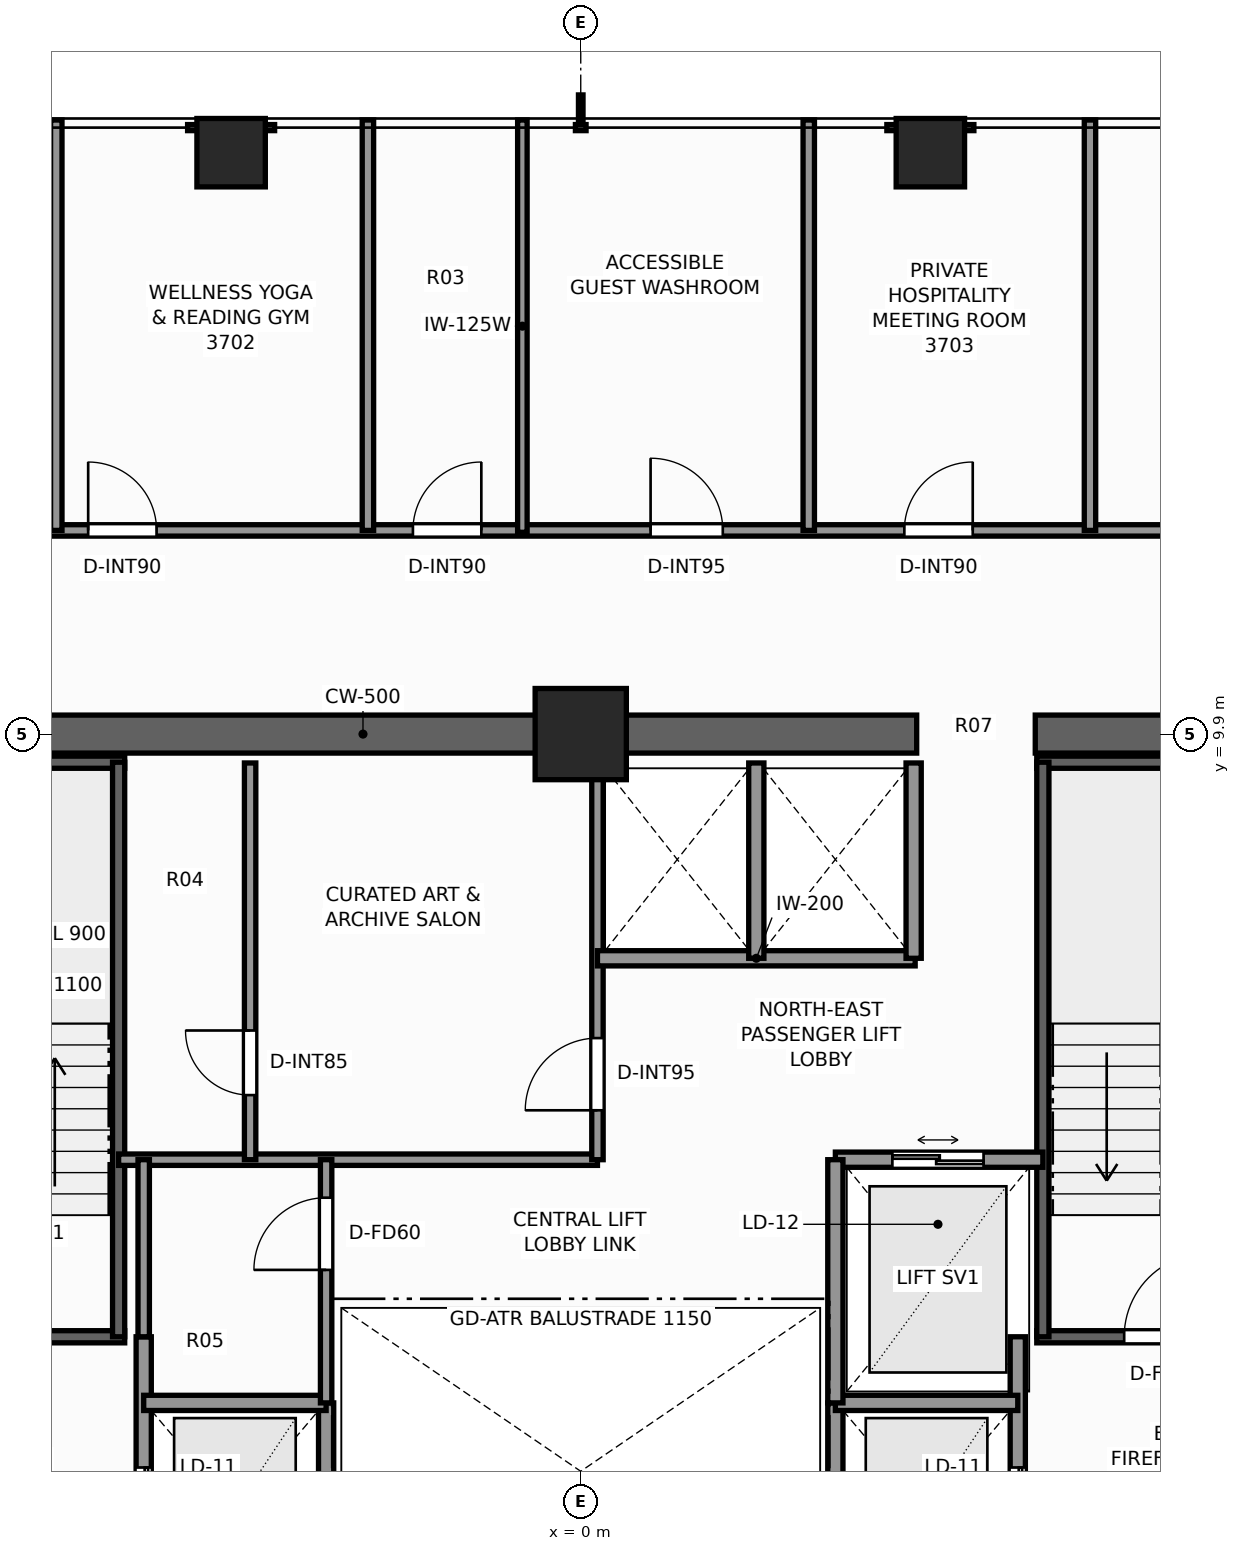
"""IFC4 building model, lengths in metres.
Left out: names, types, materials, properties, quantities, classifications, styles, units other than length and angle.
Written with IfcOpenShell. Run it as: python <this file> out.ifc"""

import sys

from ifc_helpers import new_model, si_unit, direction, frame, frame_2d, origin, origin_2d, place, context, subcontext, project, spatial, rectangle, extrude, element, fill, save


model = new_model("IFC4")
c1 = context("Model", 3, precision=1e-05, world=origin(), true_north=direction((0.0, 1.0)))
c2 = subcontext(c1, "Body", "Model", "MODEL_VIEW")
j1 = project(units=[si_unit("LENGTHUNIT", "METRE"), si_unit("PLANEANGLEUNIT", "RADIAN")], contexts=[c1])
p1 = place(None, origin())
s1 = spatial("IfcSite", under=j1, at=p1, CompositionType="ELEMENT")
p2 = place(p1, origin())
s2 = spatial("IfcBuilding", under=s1, at=p2, CompositionType="ELEMENT")
p3 = place(p2, frame((0.0, 0.0, 128.3)))
s3 = spatial("IfcBuildingStorey", under=s2, at=p3, CompositionType="ELEMENT", Elevation=128.3)
p4 = place(p3, frame((-10.15, 9.9, 0.0), z_axis=(0.0, 0.0, 1.0), x_axis=(1.0, 0.0, 0.0)))
e1 = element("IfcWall", 1, at=p4, inside=s3, PredefinedType="SHEAR", context=c2, shape_type="SweptSolid", body=[
    extrude(rectangle(XDim=14.57, YDim=0.5, at=frame_2d((7.285, 0.0))), origin(), (0.0, 0.0, 1.0), 3.3),
])
p5 = place(p3, frame((5.98, 9.9, 0.0), z_axis=(0.0, 0.0, 1.0), x_axis=(1.0, 0.0, 0.0)))
e2 = element("IfcWall", 2, at=p5, inside=s3, PredefinedType="SHEAR", context=c2, shape_type="SweptSolid", body=[
    extrude(rectangle(XDim=4.17, YDim=0.5, at=frame_2d((2.085, 0.0))), origin(), (0.0, 0.0, 1.0), 3.3),
])
p6 = place(p3, frame((0.0, 9.9, 0.0), z_axis=(0.0, 0.0, 1.0), x_axis=(1.0, 0.0, 0.0)))
e3 = element("IfcColumn", 3, at=p6, inside=s3, PredefinedType="COLUMN", context=c2, shape_type="SweptSolid", body=[
    extrude(rectangle(XDim=1.2, YDim=1.2, at=origin_2d()), origin(), (0.0, 0.0, 1.0), 3.3),
])
for number, where, z_axis, x_axis in (
    (4, (-4.6, 17.55, 0.0), (0.0, 0.0, 1.0), (1.0, 0.0, 0.0)),
    (5, (4.6, 17.55, 0.0), (0.0, 0.0, 1.0), (1.0, 0.0, 0.0)),
):
    element("IfcColumn", number, at=place(p3, frame(where, z_axis=z_axis, x_axis=x_axis)), inside=s3, PredefinedType="COLUMN", context=c2, shape_type="SweptSolid", body=[
        extrude(rectangle(XDim=0.9, YDim=0.9, at=origin_2d()), origin(), (0.0, 0.0, 1.0), 3.3),
    ])
p7 = place(p3, frame((-9.52, 1.97, 0.0), z_axis=(0.0, 0.0, 1.0), x_axis=(1.0, 0.0, 0.0)))
e6 = element("IfcWall", 6, at=p7, inside=s3, PredefinedType="SHEAR", context=c2, shape_type="SweptSolid", body=[
    extrude(rectangle(XDim=3.52, YDim=0.16, at=frame_2d((1.76, 0.0))), origin(), (0.0, 0.0, 1.0), 3.3),
])
p8 = place(p7, frame((1.15, 0.0, 0.0)))
e7 = element("IfcOpeningElement", 7, at=p8, cuts=e6, PredefinedType="OPENING", context=c2, shape_type="SweptSolid", body=[
    extrude(rectangle(XDim=1.1, YDim=2.2, at=frame_2d((0.55, 1.1))), frame((0.0, 0.09, 0.0), z_axis=(0.0, -1.0, 0.0), x_axis=(1.0, 0.0, 0.0)), (0.0, 0.0, 1.0), 0.18),
])
p9 = place(p3, frame((-9.52, 9.53, 0.0), z_axis=(0.0, 0.0, 1.0), x_axis=(1.0, 0.0, 0.0)))
e8 = element("IfcWall", 8, at=p9, inside=s3, PredefinedType="SHEAR", context=c2, shape_type="SweptSolid", body=[
    extrude(rectangle(XDim=3.52, YDim=0.16, at=frame_2d((1.76, 0.0))), origin(), (0.0, 0.0, 1.0), 3.3),
])
p10 = place(p3, frame((-6.08, 1.97, 0.0), z_axis=(0.0, 0.0, 1.0), x_axis=(0.0, 1.0, 0.0)))
e9 = element("IfcWall", 9, at=p10, inside=s3, PredefinedType="SHEAR", context=c2, shape_type="SweptSolid", body=[
    extrude(rectangle(XDim=7.56, YDim=0.16, at=frame_2d((3.78, 0.0))), origin(), (0.0, 0.0, 1.0), 3.3),
])
p11 = place(p3, frame((6.0, 1.97, 0.0), z_axis=(0.0, 0.0, 1.0), x_axis=(1.0, 0.0, 0.0)))
e10 = element("IfcWall", 10, at=p11, inside=s3, PredefinedType="SHEAR", context=c2, shape_type="SweptSolid", body=[
    extrude(rectangle(XDim=3.52, YDim=0.16, at=frame_2d((1.76, 0.0))), origin(), (0.0, 0.0, 1.0), 3.3),
])
p12 = place(p11, frame((1.15, 0.0, 0.0)))
e11 = element("IfcOpeningElement", 11, at=p12, cuts=e10, PredefinedType="OPENING", context=c2, shape_type="SweptSolid", body=[
    extrude(rectangle(XDim=1.1, YDim=2.2, at=frame_2d((0.55, 1.1))), frame((0.0, 0.09, 0.0), z_axis=(0.0, -1.0, 0.0), x_axis=(1.0, 0.0, 0.0)), (0.0, 0.0, 1.0), 0.18),
])
p13 = place(p3, frame((6.0, 9.53, 0.0), z_axis=(0.0, 0.0, 1.0), x_axis=(1.0, 0.0, 0.0)))
e12 = element("IfcWall", 12, at=p13, inside=s3, PredefinedType="SHEAR", context=c2, shape_type="SweptSolid", body=[
    extrude(rectangle(XDim=3.52, YDim=0.16, at=frame_2d((1.76, 0.0))), origin(), (0.0, 0.0, 1.0), 3.3),
])
p14 = place(p3, frame((6.08, 1.97, 0.0), z_axis=(0.0, 0.0, 1.0), x_axis=(0.0, 1.0, 0.0)))
e13 = element("IfcWall", 13, at=p14, inside=s3, PredefinedType="SHEAR", context=c2, shape_type="SweptSolid", body=[
    extrude(rectangle(XDim=7.56, YDim=0.16, at=frame_2d((3.78, 0.0))), origin(), (0.0, 0.0, 1.0), 3.3),
])
p15 = place(p3, frame((-5.75, -3.6, 0.0), z_axis=(0.0, 0.0, 1.0), x_axis=(0.0, 1.0, 0.0)))
e14 = element("IfcWall", 14, at=p15, inside=s3, PredefinedType="SOLIDWALL", context=c2, shape_type="SweptSolid", body=[
    extrude(rectangle(XDim=5.57, YDim=0.2, at=frame_2d((2.785, 0.0))), origin(), (0.0, 0.0, 1.0), 2.735),
])
p16 = place(p15, frame((2.75, 0.0, 0.0)))
e15 = element("IfcOpeningElement", 15, at=p16, cuts=e14, PredefinedType="OPENING", context=c2, shape_type="SweptSolid", body=[
    extrude(rectangle(XDim=1.1, YDim=2.2, at=frame_2d((0.55, 1.1))), frame((0.0, 0.11, 0.0), z_axis=(0.0, -1.0, 0.0), x_axis=(1.0, 0.0, 0.0)), (0.0, 0.0, 1.0), 0.22),
])
p17 = place(p3, frame((-3.35, -1.7, 0.0), z_axis=(0.0, 0.0, 1.0), x_axis=(0.0, 1.0, 0.0)))
e16 = element("IfcWall", 16, at=p17, inside=s3, PredefinedType="SOLIDWALL", context=c2, shape_type="SweptSolid", body=[
    extrude(rectangle(XDim=2.8, YDim=0.2, at=frame_2d((1.4, 0.0))), origin(), (0.0, 0.0, 1.0), 2.735),
])
p18 = place(p3, frame((-5.75, 1.1, 0.0), z_axis=(0.0, 0.0, 1.0), x_axis=(1.0, 0.0, 0.0)))
e17 = element("IfcWall", 17, at=p18, inside=s3, PredefinedType="SOLIDWALL", context=c2, shape_type="SweptSolid", body=[
    extrude(rectangle(XDim=2.4, YDim=0.2, at=frame_2d((1.2, 0.0))), origin(), (0.0, 0.0, 1.0), 3.1),
])
p19 = place(p3, frame((5.75, -3.6, 0.0), z_axis=(0.0, 0.0, 1.0), x_axis=(0.0, 1.0, 0.0)))
e18 = element("IfcWall", 18, at=p19, inside=s3, PredefinedType="SOLIDWALL", context=c2, shape_type="SweptSolid", body=[
    extrude(rectangle(XDim=5.57, YDim=0.2, at=frame_2d((2.785, 0.0))), origin(), (0.0, 0.0, 1.0), 2.735),
])
p20 = place(p19, frame((2.75, 0.0, 0.0)))
e19 = element("IfcOpeningElement", 19, at=p20, cuts=e18, PredefinedType="OPENING", context=c2, shape_type="SweptSolid", body=[
    extrude(rectangle(XDim=1.1, YDim=2.2, at=frame_2d((0.55, 1.1))), frame((0.0, 0.11, 0.0), z_axis=(0.0, -1.0, 0.0), x_axis=(1.0, 0.0, 0.0)), (0.0, 0.0, 1.0), 0.22),
])
p21 = place(p3, frame((3.35, -1.7, 0.0), z_axis=(0.0, 0.0, 1.0), x_axis=(0.0, 1.0, 0.0)))
e20 = element("IfcWall", 20, at=p21, inside=s3, PredefinedType="SOLIDWALL", context=c2, shape_type="SweptSolid", body=[
    extrude(rectangle(XDim=2.8, YDim=0.2, at=frame_2d((1.4, 0.0))), origin(), (0.0, 0.0, 1.0), 2.735),
])
p22 = place(p3, frame((3.35, 1.1, 0.0), z_axis=(0.0, 0.0, 1.0), x_axis=(1.0, 0.0, 0.0)))
e21 = element("IfcWall", 21, at=p22, inside=s3, PredefinedType="SOLIDWALL", context=c2, shape_type="SweptSolid", body=[
    extrude(rectangle(XDim=2.4, YDim=0.2, at=frame_2d((1.2, 0.0))), origin(), (0.0, 0.0, 1.0), 3.1),
])
p23 = place(p3, frame((3.35, 4.3, 0.0), z_axis=(0.0, 0.0, 1.0), x_axis=(1.0, 0.0, 0.0)))
e22 = element("IfcWall", 22, at=p23, inside=s3, PredefinedType="SOLIDWALL", context=c2, shape_type="SweptSolid", body=[
    extrude(rectangle(XDim=2.73, YDim=0.2, at=frame_2d((1.365, 0.0))), origin(), (0.0, 0.0, 1.0), 3.1),
])
p24 = place(p23, frame((0.75, 0.0, 0.0)))
e23 = element("IfcOpeningElement", 23, at=p24, cuts=e22, PredefinedType="OPENING", context=c2, shape_type="SweptSolid", body=[
    extrude(rectangle(XDim=1.2, YDim=2.25, at=frame_2d((0.6, 1.125))), frame((0.0, 0.11, 0.0), z_axis=(0.0, -1.0, 0.0), x_axis=(1.0, 0.0, 0.0)), (0.0, 0.0, 1.0), 0.22),
])
p25 = place(p3, frame((3.35, 1.1, 0.0), z_axis=(0.0, 0.0, 1.0), x_axis=(0.0, 1.0, 0.0)))
e24 = element("IfcWall", 24, at=p25, inside=s3, PredefinedType="SOLIDWALL", context=c2, shape_type="SweptSolid", body=[
    extrude(rectangle(XDim=3.2, YDim=0.2, at=frame_2d((1.6, 0.0))), origin(), (0.0, 0.0, 1.0), 2.735),
])
p26 = place(p3, frame((-6.08, 4.3, 0.0), z_axis=(0.0, 0.0, 1.0), x_axis=(1.0, 0.0, 0.0)))
e25 = element("IfcWall", 25, at=p26, inside=s3, PredefinedType="PARTITIONING", context=c2, shape_type="SweptSolid", body=[
    extrude(rectangle(XDim=6.3, YDim=0.15, at=frame_2d((3.15, 0.0))), origin(), (0.0, 0.0, 1.0), 3.1),
])
p27 = place(p3, frame((0.22, 4.3, 0.0), z_axis=(0.0, 0.0, 1.0), x_axis=(0.0, 1.0, 0.0)))
e26 = element("IfcWall", 26, at=p27, inside=s3, PredefinedType="PARTITIONING", context=c2, shape_type="SweptSolid", body=[
    extrude(rectangle(XDim=5.22, YDim=0.15, at=frame_2d((2.61, 0.0))), origin(), (0.0, 0.0, 1.0), 3.1),
])
p28 = place(p27, frame((0.65, 0.0, 0.0)))
e27 = element("IfcOpeningElement", 27, at=p28, cuts=e26, PredefinedType="OPENING", context=c2, shape_type="SweptSolid", body=[
    extrude(rectangle(XDim=0.95, YDim=2.06, at=frame_2d((0.475, 1.03))), frame((0.0, 0.085, 0.0), z_axis=(0.0, -1.0, 0.0), x_axis=(1.0, 0.0, 0.0)), (0.0, 0.0, 1.0), 0.17),
])
p29 = place(p3, frame((-4.35, 4.3, 0.0), z_axis=(0.0, 0.0, 1.0), x_axis=(0.0, 1.0, 0.0)))
e28 = element("IfcWall", 28, at=p29, inside=s3, PredefinedType="PARTITIONING", context=c2, shape_type="SweptSolid", body=[
    extrude(rectangle(XDim=5.22, YDim=0.15, at=frame_2d((2.61, 0.0))), origin(), (0.0, 0.0, 1.0), 3.1),
])
p30 = place(p29, frame((0.85, 0.0, 0.0)))
e29 = element("IfcOpeningElement", 29, at=p30, cuts=e28, PredefinedType="OPENING", context=c2, shape_type="SweptSolid", body=[
    extrude(rectangle(XDim=0.85, YDim=2.03, at=frame_2d((0.425, 1.015))), frame((0.0, 0.085, 0.0), z_axis=(0.0, -1.0, 0.0), x_axis=(1.0, 0.0, 0.0)), (0.0, 0.0, 1.0), 0.17),
])
p31 = place(p3, frame((0.22, 6.95, 0.0), z_axis=(0.0, 0.0, 1.0), x_axis=(1.0, 0.0, 0.0)))
e30 = element("IfcWall", 30, at=p31, inside=s3, PredefinedType="SOLIDWALL", context=c2, shape_type="SweptSolid", body=[
    extrude(rectangle(XDim=4.18, YDim=0.2, at=frame_2d((2.09, 0.0))), origin(), (0.0, 0.0, 1.0), 3.1),
])
for number, where, z_axis, x_axis in (
    (31, (4.38, 6.95, 0.0), (0.0, 0.0, 1.0), (0.0, 1.0, 0.0)),
    (32, (2.31, 6.95, 0.0), (0.0, 0.0, 1.0), (0.0, 1.0, 0.0)),
):
    element("IfcWall", number, at=place(p3, frame(where, z_axis=z_axis, x_axis=x_axis)), inside=s3, PredefinedType="SOLIDWALL", context=c2, shape_type="SweptSolid", body=[
        extrude(rectangle(XDim=2.57, YDim=0.2, at=frame_2d((1.285, 0.0))), origin(), (0.0, 0.0, 1.0), 3.1),
    ])
p32 = place(p3, frame((-3.35, 1.1, 0.0), z_axis=(0.0, 0.0, 1.0), x_axis=(0.0, 1.0, 0.0)))
e33 = element("IfcWall", 33, at=p32, inside=s3, PredefinedType="PARTITIONING", context=c2, shape_type="SweptSolid", body=[
    extrude(rectangle(XDim=3.2, YDim=0.15, at=frame_2d((1.6, 0.0))), origin(), (0.0, 0.0, 1.0), 2.735),
])
p33 = place(p32, frame((1.75, 0.0, 0.0)))
e34 = element("IfcOpeningElement", 34, at=p33, cuts=e33, PredefinedType="OPENING", context=c2, shape_type="SweptSolid", body=[
    extrude(rectangle(XDim=0.95, YDim=2.06, at=frame_2d((0.475, 1.03))), frame((0.0, 0.085, 0.0), z_axis=(0.0, -1.0, 0.0), x_axis=(1.0, 0.0, 0.0)), (0.0, 0.0, 1.0), 0.17),
])
p34 = place(p3, frame((-5.75, 1.97, 0.0), z_axis=(0.0, 0.0, 1.0), x_axis=(0.0, 1.0, 0.0)))
e35 = element("IfcWall", 35, at=p34, inside=s3, PredefinedType="PARTITIONING", context=c2, shape_type="SweptSolid", body=[
    extrude(rectangle(XDim=2.33, YDim=0.15, at=frame_2d((1.165, 0.0))), origin(), (0.0, 0.0, 1.0), 2.735),
])
p35 = place(p3, frame((-12.26, 12.58, 0.0), z_axis=(0.0, 0.0, 1.0), x_axis=(1.0, 0.0, 0.0)))
e36 = element("IfcWall", 36, at=p35, inside=s3, PredefinedType="PARTITIONING", context=c2, shape_type="SweptSolid", body=[
    extrude(rectangle(XDim=24.68, YDim=0.15, at=frame_2d((12.34, 0.0))), origin(), (0.0, 0.0, 1.0), 2.312),
])
p36 = place(p35, frame((3.444, 0.0, 0.0)))
e37 = element("IfcOpeningElement", 37, at=p36, cuts=e36, PredefinedType="OPENING", context=c2, shape_type="SweptSolid", body=[
    extrude(rectangle(XDim=0.9, YDim=2.06, at=frame_2d((0.45, 1.03))), frame((0.0, 0.085, 0.0), z_axis=(0.0, -1.0, 0.0), x_axis=(1.0, 0.0, 0.0)), (0.0, 0.0, 1.0), 0.17),
])
p37 = place(p35, frame((5.779, 0.0, 0.0)))
e38 = element("IfcOpeningElement", 38, at=p37, cuts=e36, PredefinedType="OPENING", context=c2, shape_type="SweptSolid", body=[
    extrude(rectangle(XDim=0.9, YDim=2.06, at=frame_2d((0.45, 1.03))), frame((0.0, 0.085, 0.0), z_axis=(0.0, -1.0, 0.0), x_axis=(1.0, 0.0, 0.0)), (0.0, 0.0, 1.0), 0.17),
])
p38 = place(p35, frame((10.052, 0.0, 0.0)))
e39 = element("IfcOpeningElement", 39, at=p38, cuts=e36, PredefinedType="OPENING", context=c2, shape_type="SweptSolid", body=[
    extrude(rectangle(XDim=0.9, YDim=2.06, at=frame_2d((0.45, 1.03))), frame((0.0, 0.085, 0.0), z_axis=(0.0, -1.0, 0.0), x_axis=(1.0, 0.0, 0.0)), (0.0, 0.0, 1.0), 0.17),
])
p39 = place(p35, frame((13.179, 0.0, 0.0)))
e40 = element("IfcOpeningElement", 40, at=p39, cuts=e36, PredefinedType="OPENING", context=c2, shape_type="SweptSolid", body=[
    extrude(rectangle(XDim=0.95, YDim=2.06, at=frame_2d((0.475, 1.03))), frame((0.0, 0.085, 0.0), z_axis=(0.0, -1.0, 0.0), x_axis=(1.0, 0.0, 0.0)), (0.0, 0.0, 1.0), 0.17),
])
p40 = place(p35, frame((16.518, 0.0, 0.0)))
e41 = element("IfcOpeningElement", 41, at=p40, cuts=e36, PredefinedType="OPENING", context=c2, shape_type="SweptSolid", body=[
    extrude(rectangle(XDim=0.9, YDim=2.06, at=frame_2d((0.45, 1.03))), frame((0.0, 0.085, 0.0), z_axis=(0.0, -1.0, 0.0), x_axis=(1.0, 0.0, 0.0)), (0.0, 0.0, 1.0), 0.17),
])
p41 = place(p35, frame((19.999, 0.0, 0.0)))
e42 = element("IfcOpeningElement", 42, at=p41, cuts=e36, PredefinedType="OPENING", context=c2, shape_type="SweptSolid", body=[
    extrude(rectangle(XDim=0.9, YDim=2.06, at=frame_2d((0.45, 1.03))), frame((0.0, 0.085, 0.0), z_axis=(0.0, -1.0, 0.0), x_axis=(1.0, 0.0, 0.0)), (0.0, 0.0, 1.0), 0.17),
])
for number, where, z_axis, x_axis in (
    (43, (-6.9, 12.58, 0.0), (0.0, 0.0, 1.0), (0.0, 1.0, 0.0)),
    (44, (-2.8, 12.58, 0.0), (0.0, 0.0, 1.0), (0.0, 1.0, 0.0)),
):
    element("IfcWall", number, at=place(p3, frame(where, z_axis=z_axis, x_axis=x_axis)), inside=s3, PredefinedType="PARTITIONING", context=c2, shape_type="SweptSolid", body=[
        extrude(rectangle(XDim=5.4, YDim=0.15, at=frame_2d((2.7, 0.0))), origin(), (0.0, 0.0, 1.0), 2.469),
    ])
p42 = place(p3, frame((3.0, 12.58, 0.0), z_axis=(0.0, 0.0, 1.0), x_axis=(0.0, 1.0, 0.0)))
e45 = element("IfcWall", 45, at=p42, inside=s3, PredefinedType="PARTITIONING", context=c2, shape_type="SweptSolid", body=[
    extrude(rectangle(XDim=5.4, YDim=0.15, at=frame_2d((2.7, 0.0))), origin(), (0.0, 0.0, 1.0), 2.389),
])
p43 = place(p3, frame((-0.768, 12.555, 0.0), z_axis=(0.0, 0.0, 1.0), x_axis=(0.0, 1.0, 0.0)))
e46 = element("IfcWall", 46, at=p43, inside=s3, PredefinedType="PARTITIONING", context=c2, shape_type="SweptSolid", body=[
    extrude(rectangle(XDim=5.425, YDim=0.125, at=frame_2d((2.712, 0.0))), origin(), (0.0, 0.0, 1.0), 2.469),
])
p44 = place(p3, frame((6.7, 12.58, 0.0), z_axis=(0.0, 0.0, 1.0), x_axis=(0.0, 1.0, 0.0)))
e47 = element("IfcWall", 47, at=p44, inside=s3, PredefinedType="PARTITIONING", context=c2, shape_type="SweptSolid", body=[
    extrude(rectangle(XDim=5.4, YDim=0.15, at=frame_2d((2.7, 0.0))), origin(), (0.0, 0.0, 1.0), 2.469),
])
p45 = place(p12, origin())
e48 = element("IfcDoor", 48, at=p45, inside=s3, OperationType="SINGLE_SWING_RIGHT", PredefinedType="DOOR", context=c2, shape_type="SweptSolid", body=[
    extrude(rectangle(XDim=1.1, YDim=2.2, at=frame_2d((0.55, 1.1))), frame((0.0, 0.025, 0.0), z_axis=(0.0, -1.0, 0.0), x_axis=(1.0, 0.0, 0.0)), (0.0, 0.0, 1.0), 0.05),
])
fill(e11, e48)
p46 = place(p16, origin())
e49 = element("IfcDoor", 49, at=p46, inside=s3, OperationType="DOUBLE_DOOR_SLIDING", PredefinedType="DOOR", context=c2, shape_type="SweptSolid", body=[
    extrude(rectangle(XDim=1.1, YDim=2.2, at=frame_2d((0.55, 1.1))), frame((0.0, 0.025, 0.0), z_axis=(0.0, -1.0, 0.0), x_axis=(1.0, 0.0, 0.0)), (0.0, 0.0, 1.0), 0.05),
])
fill(e15, e49)
p47 = place(p20, origin())
e50 = element("IfcDoor", 50, at=p47, inside=s3, OperationType="DOUBLE_DOOR_SLIDING", PredefinedType="DOOR", context=c2, shape_type="SweptSolid", body=[
    extrude(rectangle(XDim=1.1, YDim=2.2, at=frame_2d((0.55, 1.1))), frame((0.0, 0.025, 0.0), z_axis=(0.0, -1.0, 0.0), x_axis=(1.0, 0.0, 0.0)), (0.0, 0.0, 1.0), 0.05),
])
fill(e19, e50)
p48 = place(p24, origin())
e51 = element("IfcDoor", 51, at=p48, inside=s3, OperationType="DOUBLE_DOOR_SLIDING", PredefinedType="DOOR", context=c2, shape_type="SweptSolid", body=[
    extrude(rectangle(XDim=1.2, YDim=2.25, at=frame_2d((0.6, 1.125))), frame((0.0, 0.025, 0.0), z_axis=(0.0, -1.0, 0.0), x_axis=(1.0, 0.0, 0.0)), (0.0, 0.0, 1.0), 0.05),
])
fill(e23, e51)
p49 = place(p28, origin())
e52 = element("IfcDoor", 52, at=p49, inside=s3, OperationType="SINGLE_SWING_LEFT", PredefinedType="DOOR", context=c2, shape_type="SweptSolid", body=[
    extrude(rectangle(XDim=0.95, YDim=2.06, at=frame_2d((0.475, 1.03))), frame((0.0, 0.025, 0.0), z_axis=(0.0, -1.0, 0.0), x_axis=(1.0, 0.0, 0.0)), (0.0, 0.0, 1.0), 0.05),
])
fill(e27, e52)
p50 = place(p30, origin())
e53 = element("IfcDoor", 53, at=p50, inside=s3, OperationType="SINGLE_SWING_RIGHT", PredefinedType="DOOR", context=c2, shape_type="SweptSolid", body=[
    extrude(rectangle(XDim=0.85, YDim=2.03, at=frame_2d((0.425, 1.015))), frame((0.0, 0.025, 0.0), z_axis=(0.0, -1.0, 0.0), x_axis=(1.0, 0.0, 0.0)), (0.0, 0.0, 1.0), 0.05),
])
fill(e29, e53)
p51 = place(p33, origin())
e54 = element("IfcDoor", 54, at=p51, inside=s3, OperationType="SINGLE_SWING_LEFT", PredefinedType="DOOR", context=c2, shape_type="SweptSolid", body=[
    extrude(rectangle(XDim=0.95, YDim=2.06, at=frame_2d((0.475, 1.03))), frame((0.0, 0.025, 0.0), z_axis=(0.0, -1.0, 0.0), x_axis=(1.0, 0.0, 0.0)), (0.0, 0.0, 1.0), 0.05),
])
fill(e34, e54)
p52 = place(p37, origin())
e55 = element("IfcDoor", 55, at=p52, inside=s3, OperationType="SINGLE_SWING_LEFT", PredefinedType="DOOR", context=c2, shape_type="SweptSolid", body=[
    extrude(rectangle(XDim=0.9, YDim=2.06, at=frame_2d((0.45, 1.03))), frame((0.0, 0.025, 0.0), z_axis=(0.0, -1.0, 0.0), x_axis=(1.0, 0.0, 0.0)), (0.0, 0.0, 1.0), 0.05),
])
fill(e38, e55)
p53 = place(p38, origin())
e56 = element("IfcDoor", 56, at=p53, inside=s3, OperationType="SINGLE_SWING_RIGHT", PredefinedType="DOOR", context=c2, shape_type="SweptSolid", body=[
    extrude(rectangle(XDim=0.9, YDim=2.06, at=frame_2d((0.45, 1.03))), frame((0.0, 0.025, 0.0), z_axis=(0.0, -1.0, 0.0), x_axis=(1.0, 0.0, 0.0)), (0.0, 0.0, 1.0), 0.05),
])
fill(e39, e56)
p54 = place(p39, origin())
e57 = element("IfcDoor", 57, at=p54, inside=s3, OperationType="SINGLE_SWING_LEFT", PredefinedType="DOOR", context=c2, shape_type="SweptSolid", body=[
    extrude(rectangle(XDim=0.95, YDim=2.06, at=frame_2d((0.475, 1.03))), frame((0.0, 0.025, 0.0), z_axis=(0.0, -1.0, 0.0), x_axis=(1.0, 0.0, 0.0)), (0.0, 0.0, 1.0), 0.05),
])
fill(e40, e57)
p55 = place(p40, origin())
e58 = element("IfcDoor", 58, at=p55, inside=s3, OperationType="SINGLE_SWING_RIGHT", PredefinedType="DOOR", context=c2, shape_type="SweptSolid", body=[
    extrude(rectangle(XDim=0.9, YDim=2.06, at=frame_2d((0.45, 1.03))), frame((0.0, 0.025, 0.0), z_axis=(0.0, -1.0, 0.0), x_axis=(1.0, 0.0, 0.0)), (0.0, 0.0, 1.0), 0.05),
])
fill(e41, e58)
save(model, sys.argv[1])
